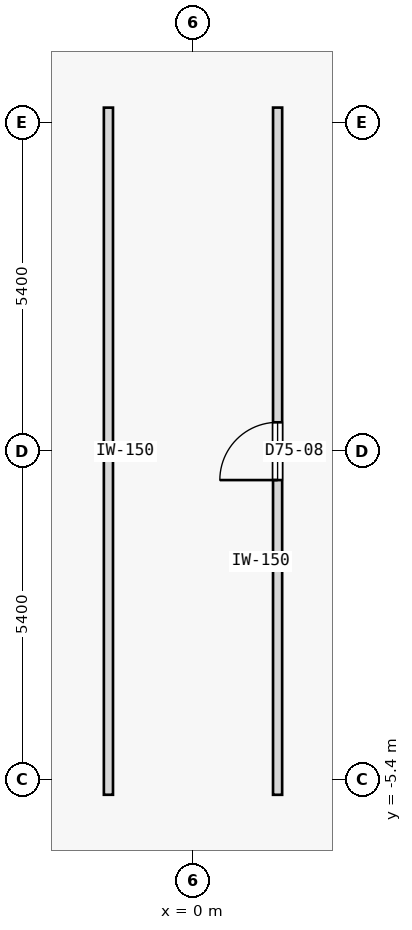
"""IFC4 building model, lengths in metres.
Left out: names, types, materials, properties, quantities, classifications, styles, units other than length and angle.
Written with IfcOpenShell. Run it as: python <this file> out.ifc"""

import sys

from ifc_helpers import new_model, si_unit, direction, frame, frame_2d, origin, place, context, subcontext, project, spatial, rectangle, extrude, element, fill, save


model = new_model("IFC4")
c1 = context("Model", 3, precision=1e-05, world=origin(), true_north=direction((0.0, 1.0)))
c2 = subcontext(c1, "Body", "Model", "MODEL_VIEW")
j1 = project(units=[si_unit("LENGTHUNIT", "METRE"), si_unit("PLANEANGLEUNIT", "RADIAN")], contexts=[c1])
p1 = place(None, origin())
s1 = spatial("IfcSite", under=j1, at=p1, CompositionType="ELEMENT")
p2 = place(p1, origin())
s2 = spatial("IfcBuilding", under=s1, at=p2, CompositionType="ELEMENT")
p3 = place(p2, frame((0.0, 0.0, 281.9)))
s3 = spatial("IfcBuildingStorey", under=s2, at=p3, CompositionType="ELEMENT", Elevation=281.9)
p4 = place(p3, frame((-1.391, -5.65, 0.0), z_axis=(0.0, 0.0, 1.0), x_axis=(-2.1605738e-05, 0.999999999767, 0.0)))
e1 = element("IfcWall", 1, at=p4, inside=s3, PredefinedType="PARTITIONING", context=c2, shape_type="SweptSolid", body=[
    extrude(rectangle(XDim=11.3, YDim=0.15, at=frame_2d((5.65, 0.0))), origin(), (0.0, 0.0, 1.0), 3.125),
])
p5 = place(p3, frame((1.391, -5.65, 0.0), z_axis=(0.0, 0.0, 1.0), x_axis=(4.3206809e-05, 0.999999999067, 0.0)))
e2 = element("IfcWall", 2, at=p5, inside=s3, PredefinedType="PARTITIONING", context=c2, shape_type="SweptSolid", body=[
    extrude(rectangle(XDim=11.301, YDim=0.15, at=frame_2d((5.65, 0.0))), origin(), (0.0, 0.0, 1.0), 3.125),
])
p6 = place(p5, frame((5.176, 0.0, 0.0)))
e3 = element("IfcOpeningElement", 3, at=p6, cuts=e2, PredefinedType="OPENING", context=c2, shape_type="SweptSolid", body=[
    extrude(rectangle(XDim=0.95, YDim=2.15, at=frame_2d((0.475, 1.075))), frame((0.0, 0.085, 0.0), z_axis=(0.0, -1.0, 0.0), x_axis=(1.0, 0.0, 0.0)), (0.0, 0.0, 1.0), 0.17),
])
p7 = place(p6, origin())
e4 = element("IfcDoor", 4, at=p7, inside=s3, OperationType="SINGLE_SWING_LEFT", PredefinedType="DOOR", context=c2, shape_type="SweptSolid", body=[
    extrude(rectangle(XDim=0.95, YDim=2.15, at=frame_2d((0.475, 1.075))), frame((0.0, 0.025, 0.0), z_axis=(0.0, -1.0, 0.0), x_axis=(1.0, 0.0, 0.0)), (0.0, 0.0, 1.0), 0.05),
])
fill(e3, e4)
save(model, sys.argv[1])
